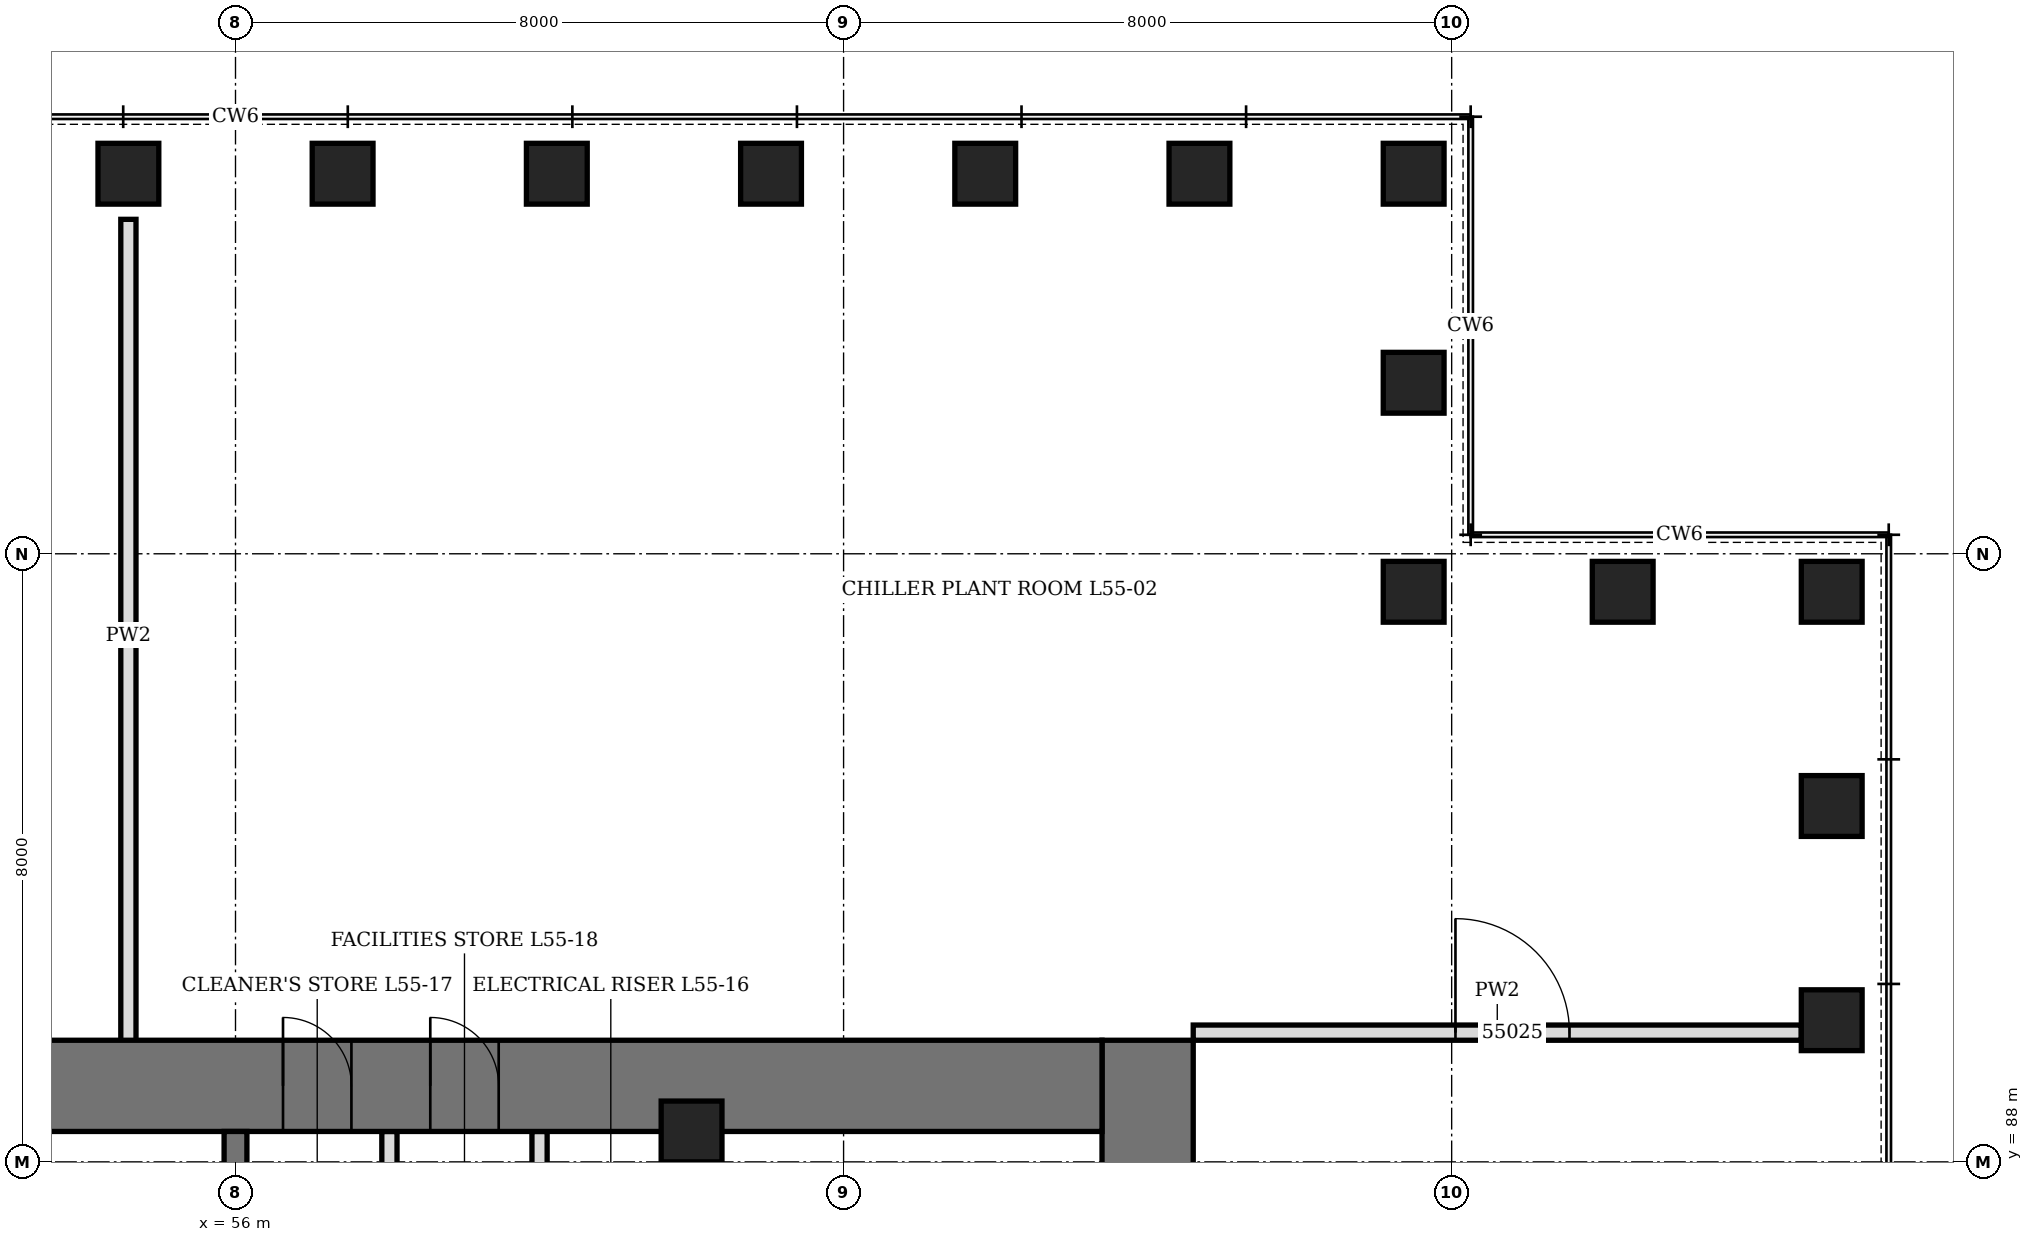
"""IFC4 building model, lengths in metres.
Left out: names, types, materials, properties, quantities, classifications, styles, units other than length and angle.
Written with IfcOpenShell. Run it as: python <this file> out.ifc"""

import sys

from ifc_helpers import new_model, si_unit, direction, frame, frame_2d, origin, origin_2d, place, context, subcontext, project, spatial, rectangle, hollow_rectangle, extrude, element, fill, save


model = new_model("IFC4")
c1 = context("Model", 3, precision=1e-05, world=origin(), true_north=direction((0.0, 1.0)))
c2 = subcontext(c1, "Body", "Model", "MODEL_VIEW")
j1 = project(units=[si_unit("LENGTHUNIT", "METRE"), si_unit("PLANEANGLEUNIT", "RADIAN")], contexts=[c1])
p1 = place(None, origin())
s1 = spatial("IfcSite", under=j1, at=p1, CompositionType="ELEMENT")
p2 = place(p1, origin())
s2 = spatial("IfcBuilding", under=s1, at=p2, CompositionType="ELEMENT")
p3 = place(p2, frame((0.0, 0.0, 244.3)))
s3 = spatial("IfcBuildingStorey", under=s2, at=p3, CompositionType="ELEMENT", Elevation=244.3)
for number, where, z_axis, x_axis in (
    (1, (77.0, 89.864, 0.0), (0.0, 0.0, 1.0), (0.0, 1.0, 0.0)),
    (2, (77.0, 92.682, 0.0), (0.0, 0.0, 1.0), (0.0, 1.0, 0.0)),
    (3, (77.0, 95.5, 0.0), (0.0, 0.0, 1.0), (1.0, 0.0, 0.0)),
    (4, (74.25, 95.5, 0.0), (0.0, 0.0, 1.0), (1.0, 0.0, 0.0)),
    (5, (71.5, 95.5, 0.0), (0.0, 0.0, 1.0), (0.0, 1.0, 0.0)),
    (6, (71.5, 98.25, 0.0), (0.0, 0.0, 1.0), (0.0, 1.0, 0.0)),
    (7, (71.5, 101.0, 0.0), (0.0, 0.0, 1.0), (1.0, 0.0, 0.0)),
    (8, (68.682, 101.0, 0.0), (0.0, 0.0, 1.0), (1.0, 0.0, 0.0)),
    (9, (65.864, 101.0, 0.0), (0.0, 0.0, 1.0), (1.0, 0.0, 0.0)),
    (10, (63.045, 101.0, 0.0), (0.0, 0.0, 1.0), (1.0, 0.0, 0.0)),
    (11, (60.227, 101.0, 0.0), (0.0, 0.0, 1.0), (1.0, 0.0, 0.0)),
    (12, (57.409, 101.0, 0.0), (0.0, 0.0, 1.0), (1.0, 0.0, 0.0)),
    (13, (54.591, 101.0, 0.0), (0.0, 0.0, 1.0), (1.0, 0.0, 0.0)),
):
    element("IfcColumn", number, at=place(p3, frame(where, z_axis=z_axis, x_axis=x_axis)), inside=s3, PredefinedType="COLUMN", context=c2, shape_type="SweptSolid", body=[
        extrude(hollow_rectangle(XDim=0.8, YDim=0.8, WallThickness=0.15, at=origin_2d()), origin(), (0.0, 0.0, 1.0), 5.84),
    ])
p4 = place(p3, frame((68.0, 70.4, 0.0), z_axis=(0.0, 0.0, 1.0), x_axis=(0.0, 1.0, 0.0)))
e14 = element("IfcWall", 14, at=p4, inside=s3, PredefinedType="SHEAR", context=c2, shape_type="SweptSolid", body=[
    extrude(rectangle(XDim=19.2, YDim=1.2, at=frame_2d((9.6, 0.0))), origin(), (0.0, 0.0, 1.0), 6.0),
])
p5 = place(p4, frame((8.6, 0.0, 0.0)))
e15 = element("IfcOpeningElement", 15, at=p5, cuts=e14, PredefinedType="OPENING", context=c2, shape_type="SweptSolid", body=[
    extrude(rectangle(XDim=2.0, YDim=2.4, at=frame_2d((1.0, 1.2))), frame((0.0, 0.61, 0.0), z_axis=(0.0, -1.0, 0.0), x_axis=(1.0, 0.0, 0.0)), (0.0, 0.0, 1.0), 1.22),
])
p6 = place(p3, frame((44.6, 89.0, 0.0), z_axis=(0.0, 0.0, 1.0), x_axis=(1.0, 0.0, 0.0)))
e16 = element("IfcWall", 16, at=p6, inside=s3, PredefinedType="SHEAR", context=c2, shape_type="SweptSolid", body=[
    extrude(rectangle(XDim=22.8, YDim=1.2, at=frame_2d((11.4, 0.0))), origin(), (0.0, 0.0, 1.0), 6.0),
])
p7 = place(p6, frame((7.9, 0.0, 0.0)))
e17 = element("IfcOpeningElement", 17, at=p7, cuts=e16, PredefinedType="OPENING", context=c2, shape_type="SweptSolid", body=[
    extrude(rectangle(XDim=1.0, YDim=2.1, at=frame_2d((0.5, 1.05))), frame((0.0, 0.61, 0.0), z_axis=(0.0, -1.0, 0.0), x_axis=(1.0, 0.0, 0.0)), (0.0, 0.0, 1.0), 1.22),
])
p8 = place(p6, frame((12.025, 0.0, 0.0)))
e18 = element("IfcOpeningElement", 18, at=p8, cuts=e16, PredefinedType="OPENING", context=c2, shape_type="SweptSolid", body=[
    extrude(rectangle(XDim=0.9, YDim=2.1, at=frame_2d((0.45, 1.05))), frame((0.0, 0.61, 0.0), z_axis=(0.0, -1.0, 0.0), x_axis=(1.0, 0.0, 0.0)), (0.0, 0.0, 1.0), 1.22),
])
p9 = place(p6, frame((13.962, 0.0, 0.0)))
e19 = element("IfcOpeningElement", 19, at=p9, cuts=e16, PredefinedType="OPENING", context=c2, shape_type="SweptSolid", body=[
    extrude(rectangle(XDim=0.9, YDim=2.1, at=frame_2d((0.45, 1.05))), frame((0.0, 0.61, 0.0), z_axis=(0.0, -1.0, 0.0), x_axis=(1.0, 0.0, 0.0)), (0.0, 0.0, 1.0), 1.22),
])
p10 = place(p3, frame((62.0, 71.6, 0.0), z_axis=(0.0, 0.0, 1.0), x_axis=(0.0, 1.0, 0.0)))
e20 = element("IfcWall", 20, at=p10, inside=s3, PredefinedType="SHEAR", context=c2, shape_type="SweptSolid", body=[
    extrude(rectangle(XDim=16.8, YDim=0.45, at=frame_2d((8.4, 0.0))), origin(), (0.0, 0.0, 1.0), 6.0),
])
p11 = place(p10, frame((7.5, 0.0, 0.0)))
e21 = element("IfcOpeningElement", 21, at=p11, cuts=e20, PredefinedType="OPENING", context=c2, shape_type="SweptSolid", body=[
    extrude(rectangle(XDim=1.8, YDim=2.4, at=frame_2d((0.9, 1.2))), frame((0.0, 0.235, 0.0), z_axis=(0.0, -1.0, 0.0), x_axis=(1.0, 0.0, 0.0)), (0.0, 0.0, 1.0), 0.47),
])
p12 = place(p3, frame((56.0, 86.225, 0.0), z_axis=(0.0, 0.0, 1.0), x_axis=(0.0, 1.0, 0.0)))
e22 = element("IfcWall", 22, at=p12, inside=s3, PredefinedType="SHEAR", context=c2, shape_type="SweptSolid", body=[
    extrude(rectangle(XDim=2.175, YDim=0.3, at=frame_2d((1.087, 0.0))), origin(), (0.0, 0.0, 1.0), 6.0),
])
p13 = place(p3, frame((62.0, 88.4, 0.0), z_axis=(0.0, 0.0, 1.0), x_axis=(1.0, 0.0, 0.0)))
e23 = element("IfcColumn", 23, at=p13, inside=s3, PredefinedType="COLUMN", context=c2, shape_type="SweptSolid", body=[
    extrude(hollow_rectangle(XDim=0.8, YDim=0.8, WallThickness=0.1, at=origin_2d()), origin(), (0.0, 0.0, 1.0), 6.0),
])
p14 = place(p3, frame((60.0, 86.225, 0.0), z_axis=(0.0, 0.0, 1.0), x_axis=(0.0, 1.0, 0.0)))
e24 = element("IfcWall", 24, at=p14, inside=s3, PredefinedType="PARTITIONING", context=c2, shape_type="SweptSolid", body=[
    extrude(rectangle(XDim=2.175, YDim=0.2, at=frame_2d((1.087, 0.0))), origin(), (0.0, 0.0, 1.0), 5.84),
])
p15 = place(p14, frame((0.637, 0.0, 0.0)))
e25 = element("IfcOpeningElement", 25, at=p15, cuts=e24, PredefinedType="OPENING", context=c2, shape_type="SweptSolid", body=[
    extrude(rectangle(XDim=0.9, YDim=2.1, at=frame_2d((0.45, 1.05))), frame((0.0, 0.11, 0.0), z_axis=(0.0, -1.0, 0.0), x_axis=(1.0, 0.0, 0.0)), (0.0, 0.0, 1.0), 0.22),
])
p16 = place(p3, frame((58.025, 86.225, 0.0), z_axis=(0.0, 0.0, 1.0), x_axis=(0.0, 1.0, 0.0)))
e26 = element("IfcWall", 26, at=p16, inside=s3, PredefinedType="PARTITIONING", context=c2, shape_type="SweptSolid", body=[
    extrude(rectangle(XDim=2.175, YDim=0.2, at=frame_2d((1.087, 0.0))), origin(), (0.0, 0.0, 1.0), 5.84),
])
p17 = place(p3, frame((54.591, 89.45, 0.0), z_axis=(0.0, 0.0, 1.0), x_axis=(0.0, 1.0, 0.0)))
e27 = element("IfcWall", 27, at=p17, inside=s3, PredefinedType="PARTITIONING", context=c2, shape_type="SweptSolid", body=[
    extrude(rectangle(XDim=10.95, YDim=0.2, at=frame_2d((5.475, 0.0))), origin(), (0.0, 0.0, 1.0), 5.078),
])
p18 = place(p3, frame((68.6, 89.7, 0.0), z_axis=(0.0, 0.0, 1.0), x_axis=(1.0, 0.0, 0.0)))
e28 = element("IfcWall", 28, at=p18, inside=s3, PredefinedType="PARTITIONING", context=c2, shape_type="SweptSolid", body=[
    extrude(rectangle(XDim=8.0, YDim=0.2, at=frame_2d((4.0, 0.0))), origin(), (0.0, 0.0, 1.0), 5.84),
])
p19 = place(p18, frame((3.45, 0.0, 0.0)))
e29 = element("IfcOpeningElement", 29, at=p19, cuts=e28, PredefinedType="OPENING", context=c2, shape_type="SweptSolid", body=[
    extrude(rectangle(XDim=1.5, YDim=2.4, at=frame_2d((0.75, 1.2))), frame((0.0, 0.11, 0.0), z_axis=(0.0, -1.0, 0.0), x_axis=(1.0, 0.0, 0.0)), (0.0, 0.0, 1.0), 0.22),
])
p20 = place(p8, origin())
e30 = element("IfcDoor", 30, at=p20, inside=s3, OperationType="SINGLE_SWING_LEFT", PredefinedType="DOOR", context=c2, shape_type="SweptSolid", body=[
    extrude(rectangle(XDim=0.9, YDim=2.1, at=frame_2d((0.45, 1.05))), frame((0.0, 0.35, 0.0), z_axis=(0.0, -1.0, 0.0), x_axis=(1.0, 0.0, 0.0)), (0.0, 0.0, 1.0), 0.7),
])
fill(e18, e30)
p21 = place(p9, origin())
e31 = element("IfcDoor", 31, at=p21, inside=s3, OperationType="SINGLE_SWING_LEFT", PredefinedType="DOOR", context=c2, shape_type="SweptSolid", body=[
    extrude(rectangle(XDim=0.9, YDim=2.1, at=frame_2d((0.45, 1.05))), frame((0.0, 0.35, 0.0), z_axis=(0.0, -1.0, 0.0), x_axis=(1.0, 0.0, 0.0)), (0.0, 0.0, 1.0), 0.7),
])
fill(e19, e31)
p22 = place(p19, origin())
e32 = element("IfcDoor", 32, at=p22, inside=s3, OperationType="DOUBLE_DOOR_SINGLE_SWING", PredefinedType="DOOR", context=c2, shape_type="SweptSolid", body=[
    extrude(rectangle(XDim=1.5, YDim=2.4, at=frame_2d((0.75, 1.2))), frame((0.0, 0.1, 0.0), z_axis=(0.0, -1.0, 0.0), x_axis=(1.0, 0.0, 0.0)), (0.0, 0.0, 1.0), 0.199),
])
fill(e29, e32)
save(model, sys.argv[1])
